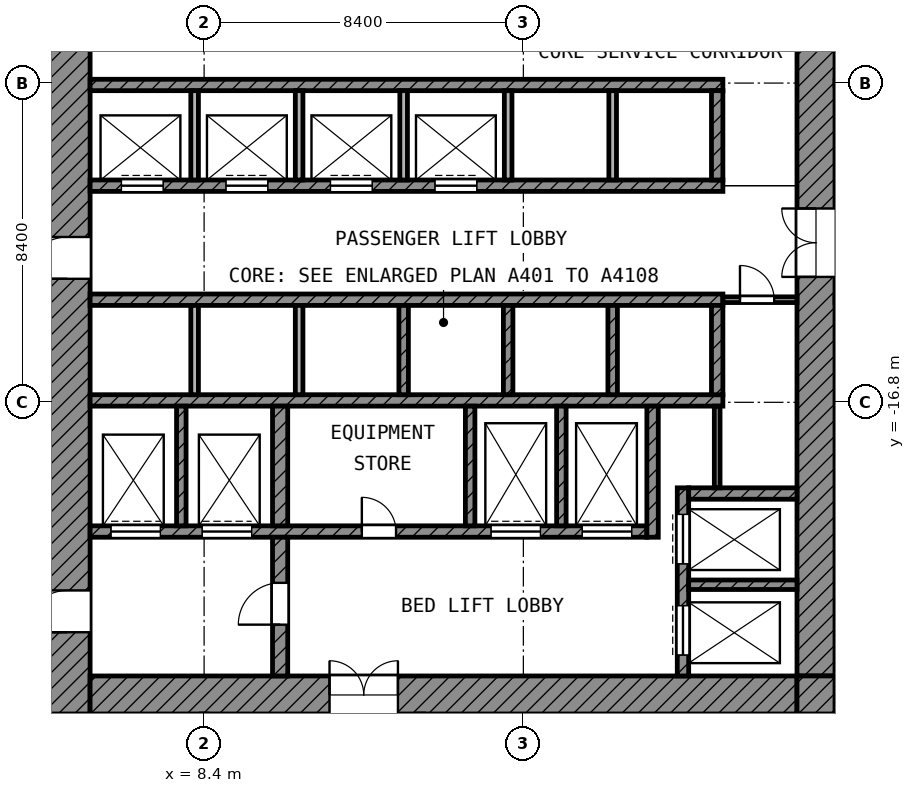
"""IFC4 building model, lengths in metres.
Left out: names, types, materials, properties, quantities, classifications, styles, units other than length and angle.
Written with IfcOpenShell. Run it as: python <this file> out.ifc"""

import sys

from ifc_helpers import new_model, si_unit, direction, frame, frame_2d, origin, place, context, subcontext, project, spatial, rectangle, extrude, element, fill, save


model = new_model("IFC4")
c1 = context("Model", 3, precision=1e-05, world=origin(), true_north=direction((0.0, 1.0)))
c2 = subcontext(c1, "Body", "Model", "MODEL_VIEW")
j1 = project(units=[si_unit("LENGTHUNIT", "METRE"), si_unit("PLANEANGLEUNIT", "RADIAN")], contexts=[c1])
p1 = place(None, origin())
s1 = spatial("IfcSite", under=j1, at=p1, CompositionType="ELEMENT")
p2 = place(p1, origin())
s2 = spatial("IfcBuilding", under=s1, at=p2, CompositionType="ELEMENT")
p3 = place(p2, frame((0.0, 0.0, 103.0)))
s3 = spatial("IfcBuildingStorey", under=s2, at=p3, CompositionType="ELEMENT", Elevation=103.0)
p4 = place(p3, frame((4.8, -25.0, 0.0), z_axis=(0.0, 0.0, 1.0), x_axis=(0.0, 1.0, 0.0)))
e1 = element("IfcWall", 1, at=p4, inside=s3, PredefinedType="SHEAR", context=c2, shape_type="SweptSolid", body=[
    extrude(rectangle(XDim=19.6, YDim=1.2, at=frame_2d((9.8, 0.0))), origin(), (0.0, 0.0, 1.0), 3.6),
])
p5 = place(p4, frame((11.45, 0.0, 0.0)))
e2 = element("IfcOpeningElement", 2, at=p5, cuts=e1, PredefinedType="OPENING", context=c2, shape_type="SweptSolid", body=[
    extrude(rectangle(XDim=1.1, YDim=2.1, at=frame_2d((0.55, 1.05))), frame((0.0, 0.61, 0.0), z_axis=(0.0, -1.0, 0.0), x_axis=(1.0, 0.0, 0.0)), (0.0, 0.0, 1.0), 1.22),
])
p6 = place(p4, frame((2.15, 0.0, 0.0)))
e3 = element("IfcOpeningElement", 3, at=p6, cuts=e1, PredefinedType="OPENING", context=c2, shape_type="SweptSolid", body=[
    extrude(rectangle(XDim=1.1, YDim=2.1, at=frame_2d((0.55, 1.05))), frame((0.0, 0.61, 0.0), z_axis=(0.0, -1.0, 0.0), x_axis=(1.0, 0.0, 0.0)), (0.0, 0.0, 1.0), 1.22),
])
p7 = place(p3, frame((24.5, -24.0, 0.0), z_axis=(0.0, 0.0, 1.0), x_axis=(0.0, 1.0, 0.0)))
e4 = element("IfcWall", 4, at=p7, inside=s3, PredefinedType="SHEAR", context=c2, shape_type="SweptSolid", body=[
    extrude(rectangle(XDim=18.6, YDim=1.0, at=frame_2d((9.3, 0.0))), origin(), (0.0, 0.0, 1.0), 3.6),
])
p8 = place(p7, frame((10.5, 0.0, 0.0)))
e5 = element("IfcOpeningElement", 5, at=p8, cuts=e4, PredefinedType="OPENING", context=c2, shape_type="SweptSolid", body=[
    extrude(rectangle(XDim=1.8, YDim=2.1, at=frame_2d((0.9, 1.05))), frame((0.0, 0.51, 0.0), z_axis=(0.0, -1.0, 0.0), x_axis=(1.0, 0.0, 0.0)), (0.0, 0.0, 1.0), 1.02),
])
p9 = place(p3, frame((5.4, -24.5, 0.0), z_axis=(0.0, 0.0, 1.0), x_axis=(1.0, 0.0, 0.0)))
e6 = element("IfcWall", 6, at=p9, inside=s3, PredefinedType="SHEAR", context=c2, shape_type="SweptSolid", body=[
    extrude(rectangle(XDim=18.6, YDim=1.0, at=frame_2d((9.3, 0.0))), origin(), (0.0, 0.0, 1.0), 3.6),
])
p10 = place(p9, frame((6.3, 0.0, 0.0)))
e7 = element("IfcOpeningElement", 7, at=p10, cuts=e6, PredefinedType="OPENING", context=c2, shape_type="SweptSolid", body=[
    extrude(rectangle(XDim=1.8, YDim=2.1, at=frame_2d((0.9, 1.05))), frame((0.0, 0.51, 0.0), z_axis=(0.0, -1.0, 0.0), x_axis=(1.0, 0.0, 0.0)), (0.0, 0.0, 1.0), 1.02),
])
p11 = place(p3, frame((24.5, -25.0, 0.0), z_axis=(0.0, 0.0, 1.0), x_axis=(0.0, 1.0, 0.0)))
e8 = element("IfcWall", 8, at=p11, inside=s3, PredefinedType="SHEAR", context=c2, shape_type="SweptSolid", body=[
    extrude(rectangle(XDim=1.0, YDim=1.0, at=frame_2d((0.5, 0.0))), origin(), (0.0, 0.0, 1.0), 3.6),
])
p12 = place(p3, frame((5.4, -8.45, 0.0), z_axis=(0.0, 0.0, 1.0), x_axis=(1.0, 0.0, 0.0)))
e9 = element("IfcWall", 9, at=p12, inside=s3, PredefinedType="SHEAR", context=c2, shape_type="SweptSolid", body=[
    extrude(rectangle(XDim=16.65, YDim=0.3, at=frame_2d((8.325, 0.0))), origin(), (0.0, 0.0, 1.0), 3.6),
])
p13 = place(p3, frame((5.4, -11.1, 0.0), z_axis=(0.0, 0.0, 1.0), x_axis=(1.0, 0.0, 0.0)))
e10 = element("IfcWall", 10, at=p13, inside=s3, PredefinedType="SHEAR", context=c2, shape_type="SweptSolid", body=[
    extrude(rectangle(XDim=16.65, YDim=0.3, at=frame_2d((8.325, 0.0))), origin(), (0.0, 0.0, 1.0), 3.6),
])
p14 = place(p13, frame((0.825, 0.0, 0.0)))
e11 = element("IfcOpeningElement", 11, at=p14, cuts=e10, PredefinedType="OPENING", context=c2, shape_type="SweptSolid", body=[
    extrude(rectangle(XDim=1.1, YDim=2.1, at=frame_2d((0.55, 1.05))), frame((0.0, 0.16, 0.0), z_axis=(0.0, -1.0, 0.0), x_axis=(1.0, 0.0, 0.0)), (0.0, 0.0, 1.0), 0.32),
])
p15 = place(p13, frame((3.575, 0.0, 0.0)))
e12 = element("IfcOpeningElement", 12, at=p15, cuts=e10, PredefinedType="OPENING", context=c2, shape_type="SweptSolid", body=[
    extrude(rectangle(XDim=1.1, YDim=2.1, at=frame_2d((0.55, 1.05))), frame((0.0, 0.16, 0.0), z_axis=(0.0, -1.0, 0.0), x_axis=(1.0, 0.0, 0.0)), (0.0, 0.0, 1.0), 0.32),
])
p16 = place(p13, frame((6.325, 0.0, 0.0)))
e13 = element("IfcOpeningElement", 13, at=p16, cuts=e10, PredefinedType="OPENING", context=c2, shape_type="SweptSolid", body=[
    extrude(rectangle(XDim=1.1, YDim=2.1, at=frame_2d((0.55, 1.05))), frame((0.0, 0.16, 0.0), z_axis=(0.0, -1.0, 0.0), x_axis=(1.0, 0.0, 0.0)), (0.0, 0.0, 1.0), 0.32),
])
p17 = place(p13, frame((9.075, 0.0, 0.0)))
e14 = element("IfcOpeningElement", 14, at=p17, cuts=e10, PredefinedType="OPENING", context=c2, shape_type="SweptSolid", body=[
    extrude(rectangle(XDim=1.1, YDim=2.1, at=frame_2d((0.55, 1.05))), frame((0.0, 0.16, 0.0), z_axis=(0.0, -1.0, 0.0), x_axis=(1.0, 0.0, 0.0)), (0.0, 0.0, 1.0), 0.32),
])
for number, where, z_axis, x_axis in (
    (15, (5.4, -14.1, 0.0), (0.0, 0.0, 1.0), (1.0, 0.0, 0.0)),
    (16, (5.4, -16.75, 0.0), (0.0, 0.0, 1.0), (1.0, 0.0, 0.0)),
):
    element("IfcWall", number, at=place(p3, frame(where, z_axis=z_axis, x_axis=x_axis)), inside=s3, PredefinedType="SHEAR", context=c2, shape_type="SweptSolid", body=[
        extrude(rectangle(XDim=16.65, YDim=0.3, at=frame_2d((8.325, 0.0))), origin(), (0.0, 0.0, 1.0), 3.6),
    ])
p18 = place(p3, frame((5.4, -20.2, 0.0), z_axis=(0.0, 0.0, 1.0), x_axis=(1.0, 0.0, 0.0)))
e17 = element("IfcWall", 17, at=p18, inside=s3, PredefinedType="SHEAR", context=c2, shape_type="SweptSolid", body=[
    extrude(rectangle(XDim=14.65, YDim=0.3, at=frame_2d((7.325, 0.0))), origin(), (0.0, 0.0, 1.0), 3.6),
])
p19 = place(p18, frame((10.55, 0.0, 0.0)))
e18 = element("IfcOpeningElement", 18, at=p19, cuts=e17, PredefinedType="OPENING", context=c2, shape_type="SweptSolid", body=[
    extrude(rectangle(XDim=1.3, YDim=2.1, at=frame_2d((0.65, 1.05))), frame((0.0, 0.16, 0.0), z_axis=(0.0, -1.0, 0.0), x_axis=(1.0, 0.0, 0.0)), (0.0, 0.0, 1.0), 0.32),
])
p20 = place(p18, frame((12.95, 0.0, 0.0)))
e19 = element("IfcOpeningElement", 19, at=p20, cuts=e17, PredefinedType="OPENING", context=c2, shape_type="SweptSolid", body=[
    extrude(rectangle(XDim=1.3, YDim=2.1, at=frame_2d((0.65, 1.05))), frame((0.0, 0.16, 0.0), z_axis=(0.0, -1.0, 0.0), x_axis=(1.0, 0.0, 0.0)), (0.0, 0.0, 1.0), 0.32),
])
p21 = place(p18, frame((0.55, 0.0, 0.0)))
e20 = element("IfcOpeningElement", 20, at=p21, cuts=e17, PredefinedType="OPENING", context=c2, shape_type="SweptSolid", body=[
    extrude(rectangle(XDim=1.3, YDim=2.1, at=frame_2d((0.65, 1.05))), frame((0.0, 0.16, 0.0), z_axis=(0.0, -1.0, 0.0), x_axis=(1.0, 0.0, 0.0)), (0.0, 0.0, 1.0), 0.32),
])
p22 = place(p18, frame((2.95, 0.0, 0.0)))
e21 = element("IfcOpeningElement", 21, at=p22, cuts=e17, PredefinedType="OPENING", context=c2, shape_type="SweptSolid", body=[
    extrude(rectangle(XDim=1.3, YDim=2.1, at=frame_2d((0.65, 1.05))), frame((0.0, 0.16, 0.0), z_axis=(0.0, -1.0, 0.0), x_axis=(1.0, 0.0, 0.0)), (0.0, 0.0, 1.0), 0.32),
])
p23 = place(p18, frame((7.15, 0.0, 0.0)))
e22 = element("IfcOpeningElement", 22, at=p23, cuts=e17, PredefinedType="OPENING", context=c2, shape_type="SweptSolid", body=[
    extrude(rectangle(XDim=0.9, YDim=2.1, at=frame_2d((0.45, 1.05))), frame((0.0, 0.16, 0.0), z_axis=(0.0, -1.0, 0.0), x_axis=(1.0, 0.0, 0.0)), (0.0, 0.0, 1.0), 0.32),
])
p24 = place(p3, frame((10.4, -24.0, 0.0), z_axis=(0.0, 0.0, 1.0), x_axis=(0.0, 1.0, 0.0)))
e23 = element("IfcWall", 23, at=p24, inside=s3, PredefinedType="SHEAR", context=c2, shape_type="SweptSolid", body=[
    extrude(rectangle(XDim=3.65, YDim=0.4, at=frame_2d((1.825, 0.0))), origin(), (0.0, 0.0, 1.0), 3.6),
])
p25 = place(p24, frame((1.35, 0.0, 0.0)))
e24 = element("IfcOpeningElement", 24, at=p25, cuts=e23, PredefinedType="OPENING", context=c2, shape_type="SweptSolid", body=[
    extrude(rectangle(XDim=1.1, YDim=2.1, at=frame_2d((0.55, 1.05))), frame((0.0, 0.21, 0.0), z_axis=(0.0, -1.0, 0.0), x_axis=(1.0, 0.0, 0.0)), (0.0, 0.0, 1.0), 0.42),
])
p26 = place(p3, frame((10.4, -20.05, 0.0), z_axis=(0.0, 0.0, 1.0), x_axis=(0.0, 1.0, 0.0)))
e25 = element("IfcWall", 25, at=p26, inside=s3, PredefinedType="SHEAR", context=c2, shape_type="SweptSolid", body=[
    extrude(rectangle(XDim=3.15, YDim=0.4, at=frame_2d((1.575, 0.0))), origin(), (0.0, 0.0, 1.0), 3.6),
])
p27 = place(p3, frame((20.2, -20.35, 0.0), z_axis=(0.0, 0.0, 1.0), x_axis=(0.0, 1.0, 0.0)))
e26 = element("IfcWall", 26, at=p27, inside=s3, PredefinedType="SHEAR", context=c2, shape_type="SweptSolid", body=[
    extrude(rectangle(XDim=3.45, YDim=0.3, at=frame_2d((1.725, 0.0))), origin(), (0.0, 0.0, 1.0), 3.6),
])
p28 = place(p3, frame((21.9, -10.95, 0.0), z_axis=(0.0, 0.0, 1.0), x_axis=(0.0, 1.0, 0.0)))
e27 = element("IfcWall", 27, at=p28, inside=s3, PredefinedType="SHEAR", context=c2, shape_type="SweptSolid", body=[
    extrude(rectangle(XDim=2.35, YDim=0.3, at=frame_2d((1.175, 0.0))), origin(), (0.0, 0.0, 1.0), 3.6),
])
p29 = place(p3, frame((21.9, -16.6, 0.0), z_axis=(0.0, 0.0, 1.0), x_axis=(0.0, 1.0, 0.0)))
e28 = element("IfcWall", 28, at=p29, inside=s3, PredefinedType="SHEAR", context=c2, shape_type="SweptSolid", body=[
    extrude(rectangle(XDim=2.35, YDim=0.3, at=frame_2d((1.175, 0.0))), origin(), (0.0, 0.0, 1.0), 3.6),
])
p30 = place(p3, frame((21.15, -19.2, 0.0), z_axis=(0.0, 0.0, 1.0), x_axis=(1.0, 0.0, 0.0)))
e29 = element("IfcWall", 29, at=p30, inside=s3, PredefinedType="SHEAR", context=c2, shape_type="SweptSolid", body=[
    extrude(rectangle(XDim=2.85, YDim=0.3, at=frame_2d((1.425, 0.0))), origin(), (0.0, 0.0, 1.0), 3.6),
])
p31 = place(p3, frame((21.0, -24.0, 0.0), z_axis=(0.0, 0.0, 1.0), x_axis=(0.0, 1.0, 0.0)))
e30 = element("IfcWall", 30, at=p31, inside=s3, PredefinedType="SHEAR", context=c2, shape_type="SweptSolid", body=[
    extrude(rectangle(XDim=4.95, YDim=0.3, at=frame_2d((2.475, 0.0))), origin(), (0.0, 0.0, 1.0), 3.6),
])
p32 = place(p31, frame((2.95, 0.0, 0.0)))
e31 = element("IfcOpeningElement", 31, at=p32, cuts=e30, PredefinedType="OPENING", context=c2, shape_type="SweptSolid", body=[
    extrude(rectangle(XDim=1.3, YDim=2.1, at=frame_2d((0.65, 1.05))), frame((0.0, 0.16, 0.0), z_axis=(0.0, -1.0, 0.0), x_axis=(1.0, 0.0, 0.0)), (0.0, 0.0, 1.0), 0.32),
])
p33 = place(p31, frame((0.55, 0.0, 0.0)))
e32 = element("IfcOpeningElement", 32, at=p33, cuts=e30, PredefinedType="OPENING", context=c2, shape_type="SweptSolid", body=[
    extrude(rectangle(XDim=1.3, YDim=2.1, at=frame_2d((0.65, 1.05))), frame((0.0, 0.16, 0.0), z_axis=(0.0, -1.0, 0.0), x_axis=(1.0, 0.0, 0.0)), (0.0, 0.0, 1.0), 0.32),
])
p34 = place(p3, frame((21.15, -21.6, 0.0), z_axis=(0.0, 0.0, 1.0), x_axis=(1.0, 0.0, 0.0)))
e33 = element("IfcWall", 33, at=p34, inside=s3, PredefinedType="SHEAR", context=c2, shape_type="SweptSolid", body=[
    extrude(rectangle(XDim=2.85, YDim=0.25, at=frame_2d((1.425, 0.0))), origin(), (0.0, 0.0, 1.0), 3.6),
])
for number, where, z_axis, x_axis in (
    (34, (7.8, -20.05, 0.0), (0.0, 0.0, 1.0), (0.0, 1.0, 0.0)),
    (35, (15.4, -20.05, 0.0), (0.0, 0.0, 1.0), (0.0, 1.0, 0.0)),
    (36, (17.8, -20.05, 0.0), (0.0, 0.0, 1.0), (0.0, 1.0, 0.0)),
):
    element("IfcWall", number, at=place(p3, frame(where, z_axis=z_axis, x_axis=x_axis)), inside=s3, PredefinedType="SHEAR", context=c2, shape_type="SweptSolid", body=[
        extrude(rectangle(XDim=3.15, YDim=0.25, at=frame_2d((1.575, 0.0))), origin(), (0.0, 0.0, 1.0), 3.6),
    ])
for number, where, z_axis, x_axis in (
    (37, (8.15, -10.95, 0.0), (0.0, 0.0, 1.0), (0.0, 1.0, 0.0)),
    (38, (10.9, -10.95, 0.0), (0.0, 0.0, 1.0), (0.0, 1.0, 0.0)),
    (39, (13.65, -10.95, 0.0), (0.0, 0.0, 1.0), (0.0, 1.0, 0.0)),
    (40, (16.4, -10.95, 0.0), (0.0, 0.0, 1.0), (0.0, 1.0, 0.0)),
    (41, (19.15, -10.95, 0.0), (0.0, 0.0, 1.0), (0.0, 1.0, 0.0)),
):
    element("IfcWall", number, at=place(p3, frame(where, z_axis=z_axis, x_axis=x_axis)), inside=s3, PredefinedType="PARTITIONING", context=c2, shape_type="SweptSolid", body=[
        extrude(rectangle(XDim=2.35, YDim=0.2, at=frame_2d((1.175, 0.0))), origin(), (0.0, 0.0, 1.0), 3.6),
    ])
for number, where, z_axis, x_axis in (
    (42, (8.15, -16.6, 0.0), (0.0, 0.0, 1.0), (0.0, 1.0, 0.0)),
    (43, (10.9, -16.6, 0.0), (0.0, 0.0, 1.0), (0.0, 1.0, 0.0)),
):
    element("IfcWall", number, at=place(p3, frame(where, z_axis=z_axis, x_axis=x_axis)), inside=s3, PredefinedType="PARTITIONING", context=c2, shape_type="SweptSolid", body=[
        extrude(rectangle(XDim=2.35, YDim=0.2, at=frame_2d((1.175, 0.0))), origin(), (0.0, 0.0, 1.0), 3.6),
    ])
for number, where, z_axis, x_axis in (
    (44, (13.65, -16.6, 0.0), (0.0, 0.0, 1.0), (0.0, 1.0, 0.0)),
    (45, (16.4, -16.6, 0.0), (0.0, 0.0, 1.0), (0.0, 1.0, 0.0)),
    (46, (19.15, -16.6, 0.0), (0.0, 0.0, 1.0), (0.0, 1.0, 0.0)),
):
    element("IfcWall", number, at=place(p3, frame(where, z_axis=z_axis, x_axis=x_axis)), inside=s3, PredefinedType="SHEAR", context=c2, shape_type="SweptSolid", body=[
        extrude(rectangle(XDim=2.35, YDim=0.25, at=frame_2d((1.175, 0.0))), origin(), (0.0, 0.0, 1.0), 3.6),
    ])
p35 = place(p3, frame((21.9, -19.05, 0.0), z_axis=(0.0, 0.0, 1.0), x_axis=(0.0, 1.0, 0.0)))
e47 = element("IfcWall", 47, at=p35, inside=s3, PredefinedType="PARTITIONING", context=c2, shape_type="SweptSolid", body=[
    extrude(rectangle(XDim=2.15, YDim=0.15, at=frame_2d((1.075, 0.0))), origin(), (0.0, 0.0, 1.0), 3.6),
])
p36 = place(p3, frame((22.05, -14.1, 0.0), z_axis=(0.0, 0.0, 1.0), x_axis=(1.0, 0.0, 0.0)))
e48 = element("IfcWall", 48, at=p36, inside=s3, PredefinedType="PARTITIONING", context=c2, shape_type="SweptSolid", body=[
    extrude(rectangle(XDim=1.95, YDim=0.15, at=frame_2d((0.975, 0.0))), origin(), (0.0, 0.0, 1.0), 3.6),
])
p37 = place(p36, frame((0.45, 0.0, 0.0)))
e49 = element("IfcOpeningElement", 49, at=p37, cuts=e48, PredefinedType="OPENING", context=c2, shape_type="SweptSolid", body=[
    extrude(rectangle(XDim=0.9, YDim=2.1, at=frame_2d((0.45, 1.05))), frame((0.0, 0.085, 0.0), z_axis=(0.0, -1.0, 0.0), x_axis=(1.0, 0.0, 0.0)), (0.0, 0.0, 1.0), 0.17),
])
p38 = place(p3, frame((8.4, -31.782, 0.0), z_axis=(0.0, 0.0, 1.0), x_axis=(0.0, 1.0, 0.0)))
e50 = element("IfcWall", 50, at=p38, inside=s3, PredefinedType="PARTITIONING", context=c2, shape_type="SweptSolid", body=[
    extrude(rectangle(XDim=6.782, YDim=0.15, at=frame_2d((3.391, 0.0))), origin(), (0.0, 0.0, 1.0), 3.6),
])
p39 = place(p3, frame((14.1, -29.325, 0.0), z_axis=(0.0, 0.0, 1.0), x_axis=(0.0, 1.0, 0.0)))
e51 = element("IfcWall", 51, at=p39, inside=s3, PredefinedType="PARTITIONING", context=c2, shape_type="SweptSolid", body=[
    extrude(rectangle(XDim=4.325, YDim=0.15, at=frame_2d((2.163, 0.0))), origin(), (0.0, 0.0, 1.0), 3.6),
])
p40 = place(p14, origin())
e52 = element("IfcDoor", 52, at=p40, inside=s3, OperationType="DOUBLE_DOOR_SLIDING", PredefinedType="DOOR", context=c2, shape_type="SweptSolid", body=[
    extrude(rectangle(XDim=1.1, YDim=2.1, at=frame_2d((0.55, 1.05))), frame((0.0, 0.025, 0.0), z_axis=(0.0, -1.0, 0.0), x_axis=(1.0, 0.0, 0.0)), (0.0, 0.0, 1.0), 0.05),
])
fill(e11, e52)
p41 = place(p15, origin())
e53 = element("IfcDoor", 53, at=p41, inside=s3, OperationType="DOUBLE_DOOR_SLIDING", PredefinedType="DOOR", context=c2, shape_type="SweptSolid", body=[
    extrude(rectangle(XDim=1.1, YDim=2.1, at=frame_2d((0.55, 1.05))), frame((0.0, 0.025, 0.0), z_axis=(0.0, -1.0, 0.0), x_axis=(1.0, 0.0, 0.0)), (0.0, 0.0, 1.0), 0.05),
])
fill(e12, e53)
p42 = place(p16, origin())
e54 = element("IfcDoor", 54, at=p42, inside=s3, OperationType="DOUBLE_DOOR_SLIDING", PredefinedType="DOOR", context=c2, shape_type="SweptSolid", body=[
    extrude(rectangle(XDim=1.1, YDim=2.1, at=frame_2d((0.55, 1.05))), frame((0.0, 0.025, 0.0), z_axis=(0.0, -1.0, 0.0), x_axis=(1.0, 0.0, 0.0)), (0.0, 0.0, 1.0), 0.05),
])
fill(e13, e54)
p43 = place(p17, origin())
e55 = element("IfcDoor", 55, at=p43, inside=s3, OperationType="DOUBLE_DOOR_SLIDING", PredefinedType="DOOR", context=c2, shape_type="SweptSolid", body=[
    extrude(rectangle(XDim=1.1, YDim=2.1, at=frame_2d((0.55, 1.05))), frame((0.0, 0.025, 0.0), z_axis=(0.0, -1.0, 0.0), x_axis=(1.0, 0.0, 0.0)), (0.0, 0.0, 1.0), 0.05),
])
fill(e14, e55)
p44 = place(p32, origin())
e56 = element("IfcDoor", 56, at=p44, inside=s3, OperationType="DOUBLE_DOOR_SLIDING", PredefinedType="DOOR", context=c2, shape_type="SweptSolid", body=[
    extrude(rectangle(XDim=1.3, YDim=2.1, at=frame_2d((0.65, 1.05))), frame((0.0, 0.025, 0.0), z_axis=(0.0, -1.0, 0.0), x_axis=(1.0, 0.0, 0.0)), (0.0, 0.0, 1.0), 0.05),
])
fill(e31, e56)
p45 = place(p33, origin())
e57 = element("IfcDoor", 57, at=p45, inside=s3, OperationType="DOUBLE_DOOR_SLIDING", PredefinedType="DOOR", context=c2, shape_type="SweptSolid", body=[
    extrude(rectangle(XDim=1.3, YDim=2.1, at=frame_2d((0.65, 1.05))), frame((0.0, 0.025, 0.0), z_axis=(0.0, -1.0, 0.0), x_axis=(1.0, 0.0, 0.0)), (0.0, 0.0, 1.0), 0.05),
])
fill(e32, e57)
p46 = place(p19, origin())
e58 = element("IfcDoor", 58, at=p46, inside=s3, OperationType="DOUBLE_DOOR_SLIDING", PredefinedType="DOOR", context=c2, shape_type="SweptSolid", body=[
    extrude(rectangle(XDim=1.3, YDim=2.1, at=frame_2d((0.65, 1.05))), frame((0.0, 0.025, 0.0), z_axis=(0.0, -1.0, 0.0), x_axis=(1.0, 0.0, 0.0)), (0.0, 0.0, 1.0), 0.05),
])
fill(e18, e58)
p47 = place(p20, origin())
e59 = element("IfcDoor", 59, at=p47, inside=s3, OperationType="DOUBLE_DOOR_SLIDING", PredefinedType="DOOR", context=c2, shape_type="SweptSolid", body=[
    extrude(rectangle(XDim=1.3, YDim=2.1, at=frame_2d((0.65, 1.05))), frame((0.0, 0.025, 0.0), z_axis=(0.0, -1.0, 0.0), x_axis=(1.0, 0.0, 0.0)), (0.0, 0.0, 1.0), 0.05),
])
fill(e19, e59)
p48 = place(p21, origin())
e60 = element("IfcDoor", 60, at=p48, inside=s3, OperationType="DOUBLE_DOOR_SLIDING", PredefinedType="DOOR", context=c2, shape_type="SweptSolid", body=[
    extrude(rectangle(XDim=1.3, YDim=2.1, at=frame_2d((0.65, 1.05))), frame((0.0, 0.025, 0.0), z_axis=(0.0, -1.0, 0.0), x_axis=(1.0, 0.0, 0.0)), (0.0, 0.0, 1.0), 0.05),
])
fill(e20, e60)
p49 = place(p22, origin())
e61 = element("IfcDoor", 61, at=p49, inside=s3, OperationType="DOUBLE_DOOR_SLIDING", PredefinedType="DOOR", context=c2, shape_type="SweptSolid", body=[
    extrude(rectangle(XDim=1.3, YDim=2.1, at=frame_2d((0.65, 1.05))), frame((0.0, 0.025, 0.0), z_axis=(0.0, -1.0, 0.0), x_axis=(1.0, 0.0, 0.0)), (0.0, 0.0, 1.0), 0.05),
])
fill(e21, e61)
p50 = place(p5, origin())
e62 = element("IfcDoor", 62, at=p50, inside=s3, OperationType="SINGLE_SWING_LEFT", PredefinedType="DOOR", context=c2, shape_type="SweptSolid", body=[
    extrude(rectangle(XDim=1.1, YDim=2.1, at=frame_2d((0.55, 1.05))), frame((0.0, 0.025, 0.0), z_axis=(0.0, -1.0, 0.0), x_axis=(1.0, 0.0, 0.0)), (0.0, 0.0, 1.0), 0.05),
])
fill(e2, e62)
p51 = place(p6, origin())
e63 = element("IfcDoor", 63, at=p51, inside=s3, OperationType="SINGLE_SWING_LEFT", PredefinedType="DOOR", context=c2, shape_type="SweptSolid", body=[
    extrude(rectangle(XDim=1.1, YDim=2.1, at=frame_2d((0.55, 1.05))), frame((0.0, 0.025, 0.0), z_axis=(0.0, -1.0, 0.0), x_axis=(1.0, 0.0, 0.0)), (0.0, 0.0, 1.0), 0.05),
])
fill(e3, e63)
p52 = place(p25, origin())
e64 = element("IfcDoor", 64, at=p52, inside=s3, OperationType="SINGLE_SWING_LEFT", PredefinedType="DOOR", context=c2, shape_type="SweptSolid", body=[
    extrude(rectangle(XDim=1.1, YDim=2.1, at=frame_2d((0.55, 1.05))), frame((0.0, 0.025, 0.0), z_axis=(0.0, -1.0, 0.0), x_axis=(1.0, 0.0, 0.0)), (0.0, 0.0, 1.0), 0.05),
])
fill(e24, e64)
p53 = place(p8, origin())
e65 = element("IfcDoor", 65, at=p53, inside=s3, OperationType="DOUBLE_DOOR_SINGLE_SWING", PredefinedType="DOOR", context=c2, shape_type="SweptSolid", body=[
    extrude(rectangle(XDim=1.8, YDim=2.1, at=frame_2d((0.9, 1.05))), frame((0.0, 0.025, 0.0), z_axis=(0.0, -1.0, 0.0), x_axis=(1.0, 0.0, 0.0)), (0.0, 0.0, 1.0), 0.05),
])
fill(e5, e65)
p54 = place(p10, origin())
e66 = element("IfcDoor", 66, at=p54, inside=s3, OperationType="DOUBLE_DOOR_SINGLE_SWING", PredefinedType="DOOR", context=c2, shape_type="SweptSolid", body=[
    extrude(rectangle(XDim=1.8, YDim=2.1, at=frame_2d((0.9, 1.05))), frame((0.0, 0.025, 0.0), z_axis=(0.0, -1.0, 0.0), x_axis=(1.0, 0.0, 0.0)), (0.0, 0.0, 1.0), 0.05),
])
fill(e7, e66)
p55 = place(p37, origin())
e67 = element("IfcDoor", 67, at=p55, inside=s3, OperationType="SINGLE_SWING_LEFT", PredefinedType="DOOR", context=c2, shape_type="SweptSolid", body=[
    extrude(rectangle(XDim=0.9, YDim=2.1, at=frame_2d((0.45, 1.05))), frame((0.0, 0.025, 0.0), z_axis=(0.0, -1.0, 0.0), x_axis=(1.0, 0.0, 0.0)), (0.0, 0.0, 1.0), 0.05),
])
fill(e49, e67)
p56 = place(p23, origin())
e68 = element("IfcDoor", 68, at=p56, inside=s3, OperationType="SINGLE_SWING_LEFT", PredefinedType="DOOR", context=c2, shape_type="SweptSolid", body=[
    extrude(rectangle(XDim=0.9, YDim=2.1, at=frame_2d((0.45, 1.05))), frame((0.0, 0.025, 0.0), z_axis=(0.0, -1.0, 0.0), x_axis=(1.0, 0.0, 0.0)), (0.0, 0.0, 1.0), 0.05),
])
fill(e22, e68)
save(model, sys.argv[1])
